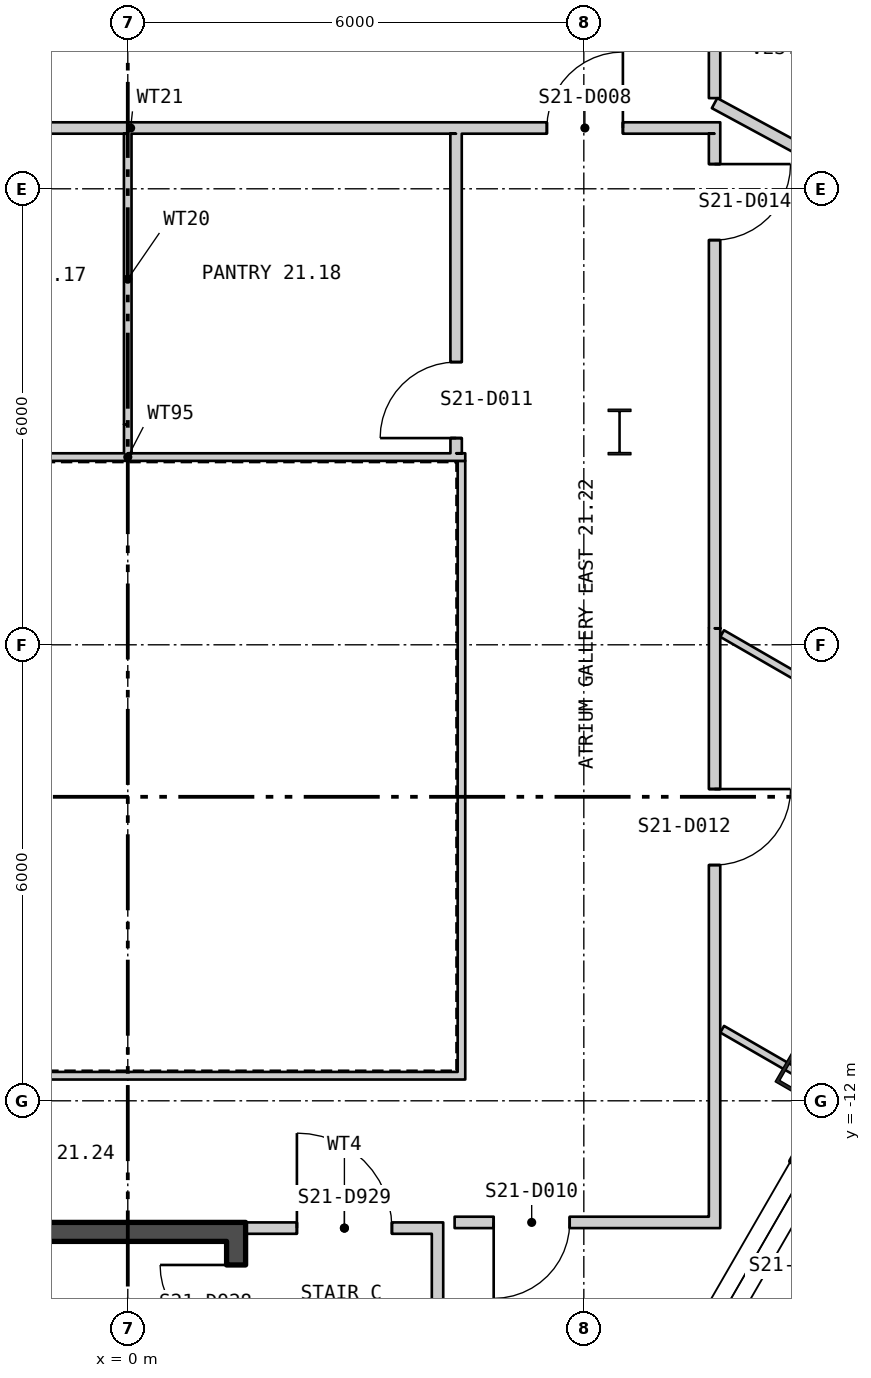
"""IFC4 building model, lengths in metres.
Left out: names, types, materials, properties, quantities, classifications, styles, units other than length and angle.
Written with IfcOpenShell. Run it as: python <this file> out.ifc"""

import sys

from ifc_helpers import new_model, si_unit, direction, frame, frame_2d, origin, origin_2d, place, context, subcontext, project, spatial, polyline, rectangle, hollow_rectangle, i_section, outline, extrude, element, fill, save


model = new_model("IFC4")
c1 = context("Model", 3, precision=1e-05, world=origin(), true_north=direction((0.0, 1.0)))
c2 = subcontext(c1, "Body", "Model", "MODEL_VIEW")
j1 = project(units=[si_unit("LENGTHUNIT", "METRE"), si_unit("PLANEANGLEUNIT", "RADIAN")], contexts=[c1])
p1 = place(None, origin())
s1 = spatial("IfcSite", under=j1, at=p1, CompositionType="ELEMENT")
p2 = place(p1, origin())
s2 = spatial("IfcBuilding", under=s1, at=p2, CompositionType="ELEMENT")
p3 = place(p2, frame((0.0, 0.0, 280.5)))
s3 = spatial("IfcBuildingStorey", under=s2, at=p3, CompositionType="ELEMENT", Elevation=280.5)
p4 = place(p3, frame((8.945, -11.707, 0.0), z_axis=(0.0, 0.0, 1.0), x_axis=(0.5, 0.866025403784, 0.0)))
e1 = element("IfcColumn", 1, at=p4, inside=s3, PredefinedType="COLUMN", context=c2, shape_type="SweptSolid", body=[
    extrude(hollow_rectangle(XDim=0.5, YDim=0.7, WallThickness=0.045, at=origin_2d()), origin(), (0.0, 0.0, 1.0), 3.9),
])
p5 = place(p3, frame((6.47, -3.2, 0.0), z_axis=(0.0, 0.0, 1.0), x_axis=(1.0, 0.0, 0.0)))
e2 = element("IfcColumn", 2, at=p5, inside=s3, PredefinedType="COLUMN", context=c2, shape_type="SweptSolid", body=[
    extrude(i_section(OverallWidth=0.3, OverallDepth=0.6, WebThickness=0.015, FlangeThickness=0.03, at=origin_2d()), origin(), (0.0, 0.0, 1.0), 3.9),
])
p6 = place(p3, frame((2.515, -23.993, -0.18), z_axis=(0.0, 0.0, 1.0), x_axis=(0.500000711659, 0.866024992908, 0.0)))
e3 = element("IfcWall", 3, at=p6, inside=s3, PredefinedType="SOLIDWALL", context=c2, shape_type="SweptSolid", body=[
    extrude(outline(polyline([(-0.13, -0.225), (45.87, -0.225), (45.61, 0.225), (0.13, 0.225), (-0.13, -0.225)])), origin(), (0.0, 0.0, 1.0), 3.68),
])
p7 = place(p6, frame((1.424, 0.0, 1.08)))
e4 = element("IfcOpeningElement", 4, at=p7, cuts=e3, PredefinedType="OPENING", context=c2, shape_type="SweptSolid", body=[
    extrude(rectangle(XDim=2.4, YDim=2.0, at=frame_2d((1.2, 1.0))), frame((0.0, 0.235, 0.0), z_axis=(0.0, -1.0, 0.0), x_axis=(1.0, 0.0, 0.0)), (0.0, 0.0, 1.0), 0.47),
])
p8 = place(p6, frame((5.893, 0.0, 1.08)))
e5 = element("IfcOpeningElement", 5, at=p8, cuts=e3, PredefinedType="OPENING", context=c2, shape_type="SweptSolid", body=[
    extrude(rectangle(XDim=2.4, YDim=2.0, at=frame_2d((1.2, 1.0))), frame((0.0, 0.235, 0.0), z_axis=(0.0, -1.0, 0.0), x_axis=(1.0, 0.0, 0.0)), (0.0, 0.0, 1.0), 0.47),
])
p9 = place(p6, frame((10.401, 0.0, 1.08)))
e6 = element("IfcOpeningElement", 6, at=p9, cuts=e3, PredefinedType="OPENING", context=c2, shape_type="SweptSolid", body=[
    extrude(rectangle(XDim=2.4, YDim=2.0, at=frame_2d((1.2, 1.0))), frame((0.0, 0.235, 0.0), z_axis=(0.0, -1.0, 0.0), x_axis=(1.0, 0.0, 0.0)), (0.0, 0.0, 1.0), 0.47),
])
p10 = place(p6, frame((14.909, 0.0, 1.08)))
e7 = element("IfcOpeningElement", 7, at=p10, cuts=e3, PredefinedType="OPENING", context=c2, shape_type="SweptSolid", body=[
    extrude(rectangle(XDim=2.4, YDim=2.0, at=frame_2d((1.2, 1.0))), frame((0.0, 0.235, 0.0), z_axis=(0.0, -1.0, 0.0), x_axis=(1.0, 0.0, 0.0)), (0.0, 0.0, 1.0), 0.47),
])
p11 = place(p6, frame((19.416, 0.0, 1.08)))
e8 = element("IfcOpeningElement", 8, at=p11, cuts=e3, PredefinedType="OPENING", context=c2, shape_type="SweptSolid", body=[
    extrude(rectangle(XDim=2.4, YDim=2.0, at=frame_2d((1.2, 1.0))), frame((0.0, 0.235, 0.0), z_axis=(0.0, -1.0, 0.0), x_axis=(1.0, 0.0, 0.0)), (0.0, 0.0, 1.0), 0.47),
])
p12 = place(p6, frame((28.431, 0.0, 1.08)))
e9 = element("IfcOpeningElement", 9, at=p12, cuts=e3, PredefinedType="OPENING", context=c2, shape_type="SweptSolid", body=[
    extrude(rectangle(XDim=2.4, YDim=2.0, at=frame_2d((1.2, 1.0))), frame((0.0, 0.235, 0.0), z_axis=(0.0, -1.0, 0.0), x_axis=(1.0, 0.0, 0.0)), (0.0, 0.0, 1.0), 0.47),
])
p13 = place(p6, frame((37.447, 0.0, 1.08)))
e10 = element("IfcOpeningElement", 10, at=p13, cuts=e3, PredefinedType="OPENING", context=c2, shape_type="SweptSolid", body=[
    extrude(rectangle(XDim=2.4, YDim=2.0, at=frame_2d((1.2, 1.0))), frame((0.0, 0.235, 0.0), z_axis=(0.0, -1.0, 0.0), x_axis=(1.0, 0.0, 0.0)), (0.0, 0.0, 1.0), 0.47),
])
p14 = place(p6, frame((41.916, 0.0, 1.08)))
e11 = element("IfcOpeningElement", 11, at=p14, cuts=e3, PredefinedType="OPENING", context=c2, shape_type="SweptSolid", body=[
    extrude(rectangle(XDim=2.4, YDim=2.0, at=frame_2d((1.2, 1.0))), frame((0.0, 0.235, 0.0), z_axis=(0.0, -1.0, 0.0), x_axis=(1.0, 0.0, 0.0)), (0.0, 0.0, 1.0), 0.47),
])
p15 = place(p3, frame((-4.44, -11.67, 0.0), z_axis=(0.0, 0.0, 1.0), x_axis=(1.0, 0.0, 0.0)))
e12 = element("IfcWall", 12, at=p15, inside=s3, PredefinedType="PARTITIONING", context=c2, shape_type="SweptSolid", body=[
    extrude(rectangle(XDim=8.88, YDim=0.1, at=frame_2d((4.44, 0.0))), origin(), (0.0, 0.0, 1.0), 3.7),
])
p16 = place(p3, frame((4.39, -11.62, 0.0), z_axis=(0.0, 0.0, 1.0), x_axis=(0.0, 1.0, 0.0)))
e13 = element("IfcWall", 13, at=p16, inside=s3, PredefinedType="PARTITIONING", context=c2, shape_type="SweptSolid", body=[
    extrude(rectangle(XDim=8.04, YDim=0.1, at=frame_2d((4.02, 0.0))), origin(), (0.0, 0.0, 1.0), 3.7),
])
p17 = place(p3, frame((4.44, -3.53, 0.0), z_axis=(0.0, 0.0, 1.0), x_axis=(-1.0, 0.0, 0.0)))
e14 = element("IfcWall", 14, at=p17, inside=s3, PredefinedType="PARTITIONING", context=c2, shape_type="SweptSolid", body=[
    extrude(rectangle(XDim=8.88, YDim=0.1, at=frame_2d((4.44, 0.0))), origin(), (0.0, 0.0, 1.0), 3.7),
])
p18 = place(p3, frame((1.425, -21.05, 0.0), z_axis=(0.0, 0.0, 1.0), x_axis=(0.0, 1.0, 0.0)))
e15 = element("IfcWall", 15, at=p18, inside=s3, PredefinedType="SHEAR", context=c2, shape_type="SweptSolid", body=[
    extrude(rectangle(XDim=7.2, YDim=0.25, at=frame_2d((3.6, 0.0))), origin(), (0.0, 0.0, 1.0), 3.7),
])
p19 = place(p18, frame((5.89, 0.0, 0.0)))
e16 = element("IfcOpeningElement", 16, at=p19, cuts=e15, PredefinedType="OPENING", context=c2, shape_type="SweptSolid", body=[
    extrude(rectangle(XDim=1.0, YDim=2.1, at=frame_2d((0.5, 1.05))), frame((0.0, 0.135, 0.0), z_axis=(0.0, -1.0, 0.0), x_axis=(1.0, 0.0, 0.0)), (0.0, 0.0, 1.0), 0.27),
])
p20 = place(p3, frame((-1.55, -13.725, 0.0), z_axis=(0.0, 0.0, 1.0), x_axis=(1.0, 0.0, 0.0)))
e17 = element("IfcWall", 17, at=p20, inside=s3, PredefinedType="SHEAR", context=c2, shape_type="SweptSolid", body=[
    extrude(rectangle(XDim=3.1, YDim=0.25, at=frame_2d((1.55, 0.0))), origin(), (0.0, 0.0, 1.0), 3.7),
])
p21 = place(p3, frame((4.075, -16.15, 0.0), z_axis=(0.0, 0.0, 1.0), x_axis=(0.0, 1.0, 0.0)))
e18 = element("IfcWall", 18, at=p21, inside=s3, PredefinedType="PARTITIONING", context=c2, shape_type="SweptSolid", body=[
    extrude(rectangle(XDim=2.4, YDim=0.15, at=frame_2d((1.2, 0.0))), origin(), (0.0, 0.0, 1.0), 3.7),
])
p22 = place(p3, frame((1.55, -13.675, 0.0), z_axis=(0.0, 0.0, 1.0), x_axis=(1.0, 0.0, 0.0)))
e19 = element("IfcWall", 19, at=p22, inside=s3, PredefinedType="PARTITIONING", context=c2, shape_type="SweptSolid", body=[
    extrude(rectangle(XDim=2.6, YDim=0.15, at=frame_2d((1.3, 0.0))), origin(), (0.0, 0.0, 1.0), 2.79),
])
p23 = place(p22, frame((0.675, 0.0, 0.0)))
e20 = element("IfcOpeningElement", 20, at=p23, cuts=e19, PredefinedType="OPENING", context=c2, shape_type="SweptSolid", body=[
    extrude(rectangle(XDim=1.25, YDim=2.1, at=frame_2d((0.625, 1.05))), frame((0.0, 0.085, 0.0), z_axis=(0.0, -1.0, 0.0), x_axis=(1.0, 0.0, 0.0)), (0.0, 0.0, 1.0), 0.17),
])
p24 = place(p3, frame((-7.72, 0.8, 0.0), z_axis=(0.0, 0.0, 1.0), x_axis=(1.0, 0.0, 0.0)))
e21 = element("IfcWall", 21, at=p24, inside=s3, PredefinedType="PARTITIONING", context=c2, shape_type="SweptSolid", body=[
    extrude(rectangle(XDim=15.515, YDim=0.15, at=frame_2d((7.758, 0.0))), origin(), (0.0, 0.0, 1.0), 3.7),
])
p25 = place(p24, frame((1.206, 0.0, 0.0)))
e22 = element("IfcOpeningElement", 22, at=p25, cuts=e21, PredefinedType="OPENING", context=c2, shape_type="SweptSolid", body=[
    extrude(rectangle(XDim=1.0, YDim=2.1, at=frame_2d((0.5, 1.05))), frame((0.0, 0.085, 0.0), z_axis=(0.0, -1.0, 0.0), x_axis=(1.0, 0.0, 0.0)), (0.0, 0.0, 1.0), 0.17),
])
p26 = place(p24, frame((13.234, 0.0, 0.0)))
e23 = element("IfcOpeningElement", 23, at=p26, cuts=e21, PredefinedType="OPENING", context=c2, shape_type="SweptSolid", body=[
    extrude(rectangle(XDim=1.0, YDim=2.1, at=frame_2d((0.5, 1.05))), frame((0.0, 0.085, 0.0), z_axis=(0.0, -1.0, 0.0), x_axis=(1.0, 0.0, 0.0)), (0.0, 0.0, 1.0), 0.17),
])
p27 = place(p3, frame((-0.001, 0.725, 0.0), z_axis=(0.0, 0.0, 1.0), x_axis=(0.000235294111, -0.999999972318, 0.0)))
e24 = element("IfcWall", 24, at=p27, inside=s3, PredefinedType="PARTITIONING", context=c2, shape_type="SweptSolid", body=[
    extrude(rectangle(XDim=3.825, YDim=0.1, at=frame_2d((1.913, 0.0))), origin(), (0.0, 0.0, 1.0), 3.2),
])
p28 = place(p3, frame((-0.0, -3.1, 0.0), z_axis=(0.0, 0.0, 1.0), x_axis=(0.000263157886, -0.999999965374, 0.0)))
e25 = element("IfcWall", 25, at=p28, inside=s3, PredefinedType="PARTITIONING", context=c2, shape_type="SweptSolid", body=[
    extrude(rectangle(XDim=0.38, YDim=0.1, at=frame_2d((0.19, 0.0))), origin(), (0.0, 0.0, 1.0), 3.7),
])
p29 = place(p3, frame((4.3, -13.6, 0.0), z_axis=(0.0, 0.0, 1.0), x_axis=(1.0, 0.0, 0.0)))
e26 = element("IfcWall", 26, at=p29, inside=s3, PredefinedType="PARTITIONING", context=c2, shape_type="SweptSolid", body=[
    extrude(rectangle(XDim=3.345, YDim=0.15, at=frame_2d((1.673, 0.0))), origin(), (0.0, 0.0, 1.0), 2.79),
])
p30 = place(p29, frame((0.514, 0.0, 0.0)))
e27 = element("IfcOpeningElement", 27, at=p30, cuts=e26, PredefinedType="OPENING", context=c2, shape_type="SweptSolid", body=[
    extrude(rectangle(XDim=1.0, YDim=2.1, at=frame_2d((0.5, 1.05))), frame((0.0, 0.085, 0.0), z_axis=(0.0, -1.0, 0.0), x_axis=(1.0, 0.0, 0.0)), (0.0, 0.0, 1.0), 0.17),
])
p31 = place(p3, frame((4.319, 0.725, 0.0), z_axis=(0.0, 0.0, 1.0), x_axis=(0.000237812122, -0.999999971723, 0.0)))
e28 = element("IfcWall", 28, at=p31, inside=s3, PredefinedType="PARTITIONING", context=c2, shape_type="SweptSolid", body=[
    extrude(rectangle(XDim=4.205, YDim=0.15, at=frame_2d((2.103, 0.0))), origin(), (0.0, 0.0, 1.0), 3.7),
])
p32 = place(p31, frame((3.005, 0.0, 0.0)))
e29 = element("IfcOpeningElement", 29, at=p32, cuts=e28, PredefinedType="OPENING", context=c2, shape_type="SweptSolid", body=[
    extrude(rectangle(XDim=1.0, YDim=2.1, at=frame_2d((0.5, 1.05))), frame((0.0, 0.085, 0.0), z_axis=(0.0, -1.0, 0.0), x_axis=(1.0, 0.0, 0.0)), (0.0, 0.0, 1.0), 0.17),
])
p33 = place(p3, frame((7.72, -13.675, 0.0), z_axis=(0.0, 0.0, 1.0), x_axis=(0.0, 1.0, 0.0)))
e30 = element("IfcWall", 30, at=p33, inside=s3, PredefinedType="PARTITIONING", context=c2, shape_type="SweptSolid", body=[
    extrude(rectangle(XDim=7.892, YDim=0.15, at=frame_2d((3.946, 0.0))), origin(), (0.0, 0.0, 1.0), 3.7),
])
p34 = place(p33, frame((4.777, 0.0, 0.0)))
e31 = element("IfcOpeningElement", 31, at=p34, cuts=e30, PredefinedType="OPENING", context=c2, shape_type="SweptSolid", body=[
    extrude(rectangle(XDim=1.0, YDim=2.1, at=frame_2d((0.5, 1.05))), frame((0.0, 0.085, 0.0), z_axis=(0.0, -1.0, 0.0), x_axis=(1.0, 0.0, 0.0)), (0.0, 0.0, 1.0), 0.17),
])
p35 = place(p3, frame((7.72, 1.127, 0.0), z_axis=(0.0, 0.0, 1.0), x_axis=(0.879447920674, -0.475995120586, 0.0)))
e32 = element("IfcWall", 32, at=p35, inside=s3, PredefinedType="PARTITIONING", context=c2, shape_type="SweptSolid", body=[
    extrude(rectangle(XDim=7.83, YDim=0.15, at=frame_2d((3.915, 0.0))), origin(), (0.0, 0.0, 1.0), 3.7),
])
p36 = place(p3, frame((7.72, 1.193, 0.0), z_axis=(0.0, 0.0, 1.0), x_axis=(0.0, 1.0, 0.0)))
e33 = element("IfcWall", 33, at=p36, inside=s3, PredefinedType="PARTITIONING", context=c2, shape_type="SweptSolid", body=[
    extrude(rectangle(XDim=0.932, YDim=0.15, at=frame_2d((0.466, 0.0))), origin(), (0.0, 0.0, 1.0), 3.7),
])
p37 = place(p3, frame((7.72, 0.725, 0.0), z_axis=(0.0, 0.0, 1.0), x_axis=(0.000153657036, -0.999999988195, 0.0)))
e34 = element("IfcWall", 34, at=p37, inside=s3, PredefinedType="PARTITIONING", context=c2, shape_type="SweptSolid", body=[
    extrude(rectangle(XDim=6.508, YDim=0.15, at=frame_2d((3.254, 0.0))), origin(), (0.0, 0.0, 1.0), 3.7),
])
p38 = place(p37, frame((0.4, 0.0, 0.0)))
e35 = element("IfcOpeningElement", 35, at=p38, cuts=e34, PredefinedType="OPENING", context=c2, shape_type="SweptSolid", body=[
    extrude(rectangle(XDim=1.0, YDim=2.1, at=frame_2d((0.5, 1.05))), frame((0.0, 0.085, 0.0), z_axis=(0.0, -1.0, 0.0), x_axis=(1.0, 0.0, 0.0)), (0.0, 0.0, 1.0), 0.17),
])
p39 = place(p3, frame((7.82, -5.852, 0.0), z_axis=(0.0, 0.0, 1.0), x_axis=(0.865984062371, -0.500071598593, 0.0)))
e36 = element("IfcWall", 36, at=p39, inside=s3, PredefinedType="PARTITIONING", context=c2, shape_type="SweptSolid", body=[
    extrude(rectangle(XDim=3.801, YDim=0.1, at=frame_2d((1.901, 0.0))), origin(), (0.0, 0.0, 1.0), 3.7),
])
p40 = place(p3, frame((7.82, -11.058, 0.0), z_axis=(0.0, 0.0, 1.0), x_axis=(0.866130014302, -0.499818765479, 0.0)))
e37 = element("IfcWall", 37, at=p40, inside=s3, PredefinedType="PARTITIONING", context=c2, shape_type="SweptSolid", body=[
    extrude(rectangle(XDim=1.198, YDim=0.1, at=frame_2d((0.599, 0.0))), origin(), (0.0, 0.0, 1.0), 3.7),
])
p41 = place(p9, origin())
e38 = element("IfcWindow", 38, at=p41, inside=s3, PartitioningType="SINGLE_PANEL", PredefinedType="WINDOW", context=c2, shape_type="SweptSolid", body=[
    extrude(rectangle(XDim=2.4, YDim=2.0, at=frame_2d((1.2, 1.0))), frame((0.0, 0.105, 0.0), z_axis=(0.0, -1.0, 0.0), x_axis=(1.0, 0.0, 0.0)), (0.0, 0.0, 1.0), 0.06),
])
fill(e6, e38)
p42 = place(p19, origin())
e39 = element("IfcDoor", 39, at=p42, inside=s3, OperationType="SINGLE_SWING_LEFT", PredefinedType="DOOR", context=c2, shape_type="SweptSolid", body=[
    extrude(rectangle(XDim=1.0, YDim=2.1, at=frame_2d((0.5, 1.05))), frame((0.0, 0.025, 0.0), z_axis=(0.0, -1.0, 0.0), x_axis=(1.0, 0.0, 0.0)), (0.0, 0.0, 1.0), 0.05),
])
fill(e16, e39)
p43 = place(p23, origin())
e40 = element("IfcDoor", 40, at=p43, inside=s3, OperationType="SINGLE_SWING_RIGHT", PredefinedType="DOOR", context=c2, shape_type="SweptSolid", body=[
    extrude(rectangle(XDim=1.25, YDim=2.1, at=frame_2d((0.625, 1.05))), frame((0.0, 0.025, 0.0), z_axis=(0.0, -1.0, 0.0), x_axis=(1.0, 0.0, 0.0)), (0.0, 0.0, 1.0), 0.05),
])
fill(e20, e40)
p44 = place(p26, origin())
e41 = element("IfcDoor", 41, at=p44, inside=s3, OperationType="SINGLE_SWING_LEFT", PredefinedType="DOOR", context=c2, shape_type="SweptSolid", body=[
    extrude(rectangle(XDim=1.0, YDim=2.1, at=frame_2d((0.5, 1.05))), frame((0.0, 0.025, 0.0), z_axis=(0.0, -1.0, 0.0), x_axis=(1.0, 0.0, 0.0)), (0.0, 0.0, 1.0), 0.05),
])
fill(e23, e41)
p45 = place(p30, origin())
e42 = element("IfcDoor", 42, at=p45, inside=s3, OperationType="SINGLE_SWING_LEFT", PredefinedType="DOOR", context=c2, shape_type="SweptSolid", body=[
    extrude(rectangle(XDim=1.0, YDim=2.1, at=frame_2d((0.5, 1.05))), frame((0.0, 0.025, 0.0), z_axis=(0.0, -1.0, 0.0), x_axis=(1.0, 0.0, 0.0)), (0.0, 0.0, 1.0), 0.05),
])
fill(e27, e42)
p46 = place(p32, origin())
e43 = element("IfcDoor", 43, at=p46, inside=s3, OperationType="SINGLE_SWING_RIGHT", PredefinedType="DOOR", context=c2, shape_type="SweptSolid", body=[
    extrude(rectangle(XDim=1.0, YDim=2.1, at=frame_2d((0.5, 1.05))), frame((0.0, 0.025, 0.0), z_axis=(0.0, -1.0, 0.0), x_axis=(1.0, 0.0, 0.0)), (0.0, 0.0, 1.0), 0.05),
])
fill(e29, e43)
p47 = place(p34, origin())
e44 = element("IfcDoor", 44, at=p47, inside=s3, OperationType="SINGLE_SWING_RIGHT", PredefinedType="DOOR", context=c2, shape_type="SweptSolid", body=[
    extrude(rectangle(XDim=1.0, YDim=2.1, at=frame_2d((0.5, 1.05))), frame((0.0, 0.025, 0.0), z_axis=(0.0, -1.0, 0.0), x_axis=(1.0, 0.0, 0.0)), (0.0, 0.0, 1.0), 0.05),
])
fill(e31, e44)
p48 = place(p38, origin())
e45 = element("IfcDoor", 45, at=p48, inside=s3, OperationType="SINGLE_SWING_RIGHT", PredefinedType="DOOR", context=c2, shape_type="SweptSolid", body=[
    extrude(rectangle(XDim=1.0, YDim=2.1, at=frame_2d((0.5, 1.05))), frame((0.0, 0.025, 0.0), z_axis=(0.0, -1.0, 0.0), x_axis=(1.0, 0.0, 0.0)), (0.0, 0.0, 1.0), 0.05),
])
fill(e35, e45)
save(model, sys.argv[1])
